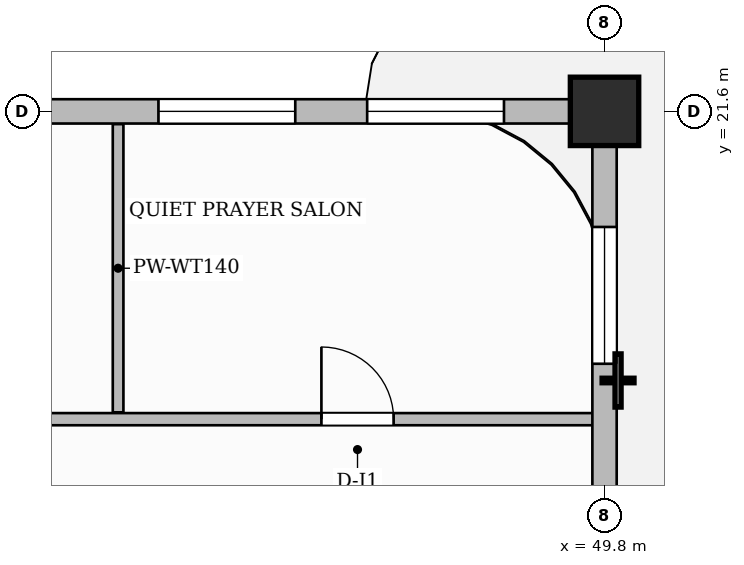
"""IFC4 building model, lengths in metres.
Left out: names, types, materials, properties, quantities, classifications, styles, units other than length and angle.
Written with IfcOpenShell. Run it as: python <this file> out.ifc"""

import sys

from ifc_helpers import new_model, si_unit, direction, frame, frame_2d, origin, origin_2d, place, context, subcontext, project, spatial, rectangle, extrude, source, transform, mapped, element, fill, save


model = new_model("IFC4")
c1 = context("Model", 3, precision=1e-05, world=origin(), true_north=direction((0.0, 1.0)))
c2 = subcontext(c1, "Body", "Model", "MODEL_VIEW")
j1 = project(units=[si_unit("LENGTHUNIT", "METRE"), si_unit("PLANEANGLEUNIT", "RADIAN")], contexts=[c1])
p1 = place(None, origin())
s1 = spatial("IfcSite", under=j1, at=p1, CompositionType="ELEMENT")
p2 = place(p1, origin())
s2 = spatial("IfcBuilding", under=s1, at=p2, CompositionType="ELEMENT")
p3 = place(p2, frame((0.0, 0.0, 240.4)))
s3 = spatial("IfcBuildingStorey", under=s2, at=p3, CompositionType="ELEMENT", Elevation=240.4)
m1 = source(origin(), c2, "Body", "SweptSolid", [
    extrude(rectangle(XDim=0.9, YDim=0.9, at=origin_2d()), origin(), (0.0, 0.0, 1.0), 3.85),
])
p4 = place(p3, frame((49.8, 21.6, 0.0), z_axis=(0.0, 0.0, 1.0), x_axis=(1.0, 0.0, 0.0)))
e1 = element("IfcColumn", 1, at=p4, inside=s3, PredefinedType="COLUMN", context=c2, shape_type="MappedRepresentation", body=[
    mapped(m1, transform((0.0, 0.0, 0.0), scale=1.0)),
])
p5 = place(p3, frame((30.29, 17.55, 0.0), z_axis=(0.0, 0.0, 1.0), x_axis=(1.0, 0.0, 0.0)))
e2 = element("IfcWall", 2, at=p5, inside=s3, PredefinedType="PARTITIONING", context=c2, shape_type="SweptSolid", body=[
    extrude(rectangle(XDim=19.37, YDim=0.16, at=frame_2d((9.685, 0.0))), origin(), (0.0, 0.0, 1.0), 3.6),
])
p6 = place(p5, frame((1.235, 0.0, 0.0)))
e3 = element("IfcOpeningElement", 3, at=p6, cuts=e2, PredefinedType="OPENING", context=c2, shape_type="SweptSolid", body=[
    extrude(rectangle(XDim=0.85, YDim=2.1, at=frame_2d((0.425, 1.05))), frame((0.0, 0.09, 0.0), z_axis=(0.0, -1.0, 0.0), x_axis=(1.0, 0.0, 0.0)), (0.0, 0.0, 1.0), 0.18),
])
p7 = place(p5, frame((7.56, 0.0, 0.0)))
e4 = element("IfcOpeningElement", 4, at=p7, cuts=e2, PredefinedType="OPENING", context=c2, shape_type="SweptSolid", body=[
    extrude(rectangle(XDim=1.4, YDim=2.35, at=frame_2d((0.7, 1.175))), frame((0.0, 0.09, 0.0), z_axis=(0.0, -1.0, 0.0), x_axis=(1.0, 0.0, 0.0)), (0.0, 0.0, 1.0), 0.18),
])
p8 = place(p5, frame((15.785, 0.0, 0.0)))
e5 = element("IfcOpeningElement", 5, at=p8, cuts=e2, PredefinedType="OPENING", context=c2, shape_type="SweptSolid", body=[
    extrude(rectangle(XDim=0.95, YDim=2.15, at=frame_2d((0.475, 1.075))), frame((0.0, 0.09, 0.0), z_axis=(0.0, -1.0, 0.0), x_axis=(1.0, 0.0, 0.0)), (0.0, 0.0, 1.0), 0.18),
])
p9 = place(p3, frame((43.4, 17.64, 0.0), z_axis=(0.0, 0.0, 1.0), x_axis=(0.0, 1.0, 0.0)))
e6 = element("IfcWall", 6, at=p9, inside=s3, PredefinedType="PARTITIONING", context=c2, shape_type="SweptSolid", body=[
    extrude(rectangle(XDim=3.792, YDim=0.14, at=frame_2d((1.896, 0.0))), origin(), (0.0, 0.0, 1.0), 3.6),
])
p10 = place(p3, frame((49.8, 14.62, 0.0), z_axis=(0.0, 0.0, 1.0), x_axis=(0.0, 1.0, 0.0)))
e7 = element("IfcWall", 7, at=p10, inside=s3, PredefinedType="SOLIDWALL", context=c2, shape_type="SweptSolid", body=[
    extrude(rectangle(XDim=6.93, YDim=0.32, at=frame_2d((3.465, 0.0))), origin(), (0.0, 0.0, 1.0), 3.135),
])
p11 = place(p10, frame((0.42, 0.0, 0.0)))
e8 = element("IfcOpeningElement", 8, at=p11, cuts=e7, PredefinedType="OPENING", context=c2, shape_type="SweptSolid", body=[
    extrude(rectangle(XDim=1.2, YDim=2.2, at=frame_2d((0.6, 1.1))), frame((0.0, 0.17, 0.0), z_axis=(0.0, -1.0, 0.0), x_axis=(1.0, 0.0, 0.0)), (0.0, 0.0, 1.0), 0.34),
])
p12 = place(p10, frame((3.659, 0.0, 0.8)))
e9 = element("IfcOpeningElement", 9, at=p12, cuts=e7, PredefinedType="OPENING", context=c2, shape_type="SweptSolid", body=[
    extrude(rectangle(XDim=1.8, YDim=1.85, at=frame_2d((0.9, 0.925))), frame((0.0, 0.17, 0.0), z_axis=(0.0, -1.0, 0.0), x_axis=(1.0, 0.0, 0.0)), (0.0, 0.0, 1.0), 0.34),
])
p13 = place(p3, frame((14.4, 21.6, 0.0), z_axis=(0.0, 0.0, 1.0), x_axis=(1.0, 0.0, 0.0)))
e10 = element("IfcWall", 10, at=p13, inside=s3, PredefinedType="SOLIDWALL", context=c2, shape_type="SweptSolid", body=[
    extrude(rectangle(XDim=35.4, YDim=0.32, at=frame_2d((17.7, 0.0))), origin(), (0.0, 0.0, 1.0), 3.135),
])
p14 = place(p13, frame((0.85, 0.0, 0.0)))
e11 = element("IfcOpeningElement", 11, at=p14, cuts=e10, PredefinedType="OPENING", context=c2, shape_type="SweptSolid", body=[
    extrude(rectangle(XDim=1.2, YDim=2.2, at=frame_2d((0.6, 1.1))), frame((0.0, 0.17, 0.0), z_axis=(0.0, -1.0, 0.0), x_axis=(1.0, 0.0, 0.0)), (0.0, 0.0, 1.0), 0.34),
])
p15 = place(p13, frame((3.475, 0.0, 0.8)))
e12 = element("IfcOpeningElement", 12, at=p15, cuts=e10, PredefinedType="OPENING", context=c2, shape_type="SweptSolid", body=[
    extrude(rectangle(XDim=1.8, YDim=1.85, at=frame_2d((0.9, 0.925))), frame((0.0, 0.17, 0.0), z_axis=(0.0, -1.0, 0.0), x_axis=(1.0, 0.0, 0.0)), (0.0, 0.0, 1.0), 0.34),
])
p16 = place(p13, frame((8.181, 0.0, 0.8)))
e13 = element("IfcOpeningElement", 13, at=p16, cuts=e10, PredefinedType="OPENING", context=c2, shape_type="SweptSolid", body=[
    extrude(rectangle(XDim=0.95, YDim=1.75, at=frame_2d((0.475, 0.875))), frame((0.0, 0.17, 0.0), z_axis=(0.0, -1.0, 0.0), x_axis=(1.0, 0.0, 0.0)), (0.0, 0.0, 1.0), 0.34),
])
p17 = place(p13, frame((10.564, 0.0, 0.8)))
e14 = element("IfcOpeningElement", 14, at=p17, cuts=e10, PredefinedType="OPENING", context=c2, shape_type="SweptSolid", body=[
    extrude(rectangle(XDim=1.8, YDim=1.85, at=frame_2d((0.9, 0.925))), frame((0.0, 0.17, 0.0), z_axis=(0.0, -1.0, 0.0), x_axis=(1.0, 0.0, 0.0)), (0.0, 0.0, 1.0), 0.34),
])
p18 = place(p13, frame((16.651, 0.0, 0.8)))
e15 = element("IfcOpeningElement", 15, at=p18, cuts=e10, PredefinedType="OPENING", context=c2, shape_type="SweptSolid", body=[
    extrude(rectangle(XDim=1.8, YDim=1.85, at=frame_2d((0.9, 0.925))), frame((0.0, 0.17, 0.0), z_axis=(0.0, -1.0, 0.0), x_axis=(1.0, 0.0, 0.0)), (0.0, 0.0, 1.0), 0.34),
])
p19 = place(p13, frame((21.725, 0.0, 0.8)))
e16 = element("IfcOpeningElement", 16, at=p19, cuts=e10, PredefinedType="OPENING", context=c2, shape_type="SweptSolid", body=[
    extrude(rectangle(XDim=1.8, YDim=1.85, at=frame_2d((0.9, 0.925))), frame((0.0, 0.17, 0.0), z_axis=(0.0, -1.0, 0.0), x_axis=(1.0, 0.0, 0.0)), (0.0, 0.0, 1.0), 0.34),
])
p20 = place(p13, frame((24.475, 0.0, 0.8)))
e17 = element("IfcOpeningElement", 17, at=p20, cuts=e10, PredefinedType="OPENING", context=c2, shape_type="SweptSolid", body=[
    extrude(rectangle(XDim=1.8, YDim=1.85, at=frame_2d((0.9, 0.925))), frame((0.0, 0.17, 0.0), z_axis=(0.0, -1.0, 0.0), x_axis=(1.0, 0.0, 0.0)), (0.0, 0.0, 1.0), 0.34),
])
p21 = place(p13, frame((29.531, 0.0, 0.8)))
e18 = element("IfcOpeningElement", 18, at=p21, cuts=e10, PredefinedType="OPENING", context=c2, shape_type="SweptSolid", body=[
    extrude(rectangle(XDim=1.8, YDim=1.85, at=frame_2d((0.9, 0.925))), frame((0.0, 0.17, 0.0), z_axis=(0.0, -1.0, 0.0), x_axis=(1.0, 0.0, 0.0)), (0.0, 0.0, 1.0), 0.34),
])
p22 = place(p13, frame((32.277, 0.0, 0.8)))
e19 = element("IfcOpeningElement", 19, at=p22, cuts=e10, PredefinedType="OPENING", context=c2, shape_type="SweptSolid", body=[
    extrude(rectangle(XDim=1.8, YDim=1.85, at=frame_2d((0.9, 0.925))), frame((0.0, 0.17, 0.0), z_axis=(0.0, -1.0, 0.0), x_axis=(1.0, 0.0, 0.0)), (0.0, 0.0, 1.0), 0.34),
])
m2 = source(origin(), c2, "Body", "SweptSolid", [
    extrude(rectangle(XDim=0.95, YDim=2.15, at=frame_2d((0.475, 1.075))), frame((0.0, 0.025, 0.0), z_axis=(0.0, -1.0, 0.0), x_axis=(1.0, 0.0, 0.0)), (0.0, 0.0, 1.0), 0.05),
])
p23 = place(p8, origin())
e20 = element("IfcDoor", 20, at=p23, inside=s3, OperationType="SINGLE_SWING_LEFT", PredefinedType="DOOR", context=c2, shape_type="MappedRepresentation", body=[
    mapped(m2, transform((0.0, 0.0, 0.0), scale=1.0)),
])
fill(e5, e20)
m3 = source(origin(), c2, "Body", "SweptSolid", [
    extrude(rectangle(XDim=1.8, YDim=1.85, at=frame_2d((0.9, 0.925))), frame((0.0, 0.03, 0.0), z_axis=(0.0, -1.0, 0.0), x_axis=(1.0, 0.0, 0.0)), (0.0, 0.0, 1.0), 0.06),
])
p24 = place(p12, origin())
e21 = element("IfcWindow", 21, at=p24, inside=s3, PartitioningType="DOUBLE_PANEL_VERTICAL", PredefinedType="WINDOW", context=c2, shape_type="MappedRepresentation", body=[
    mapped(m3, transform((0.0, 0.0, 0.0), scale=1.0)),
])
fill(e9, e21)
p25 = place(p21, origin())
e22 = element("IfcWindow", 22, at=p25, inside=s3, PartitioningType="DOUBLE_PANEL_VERTICAL", PredefinedType="WINDOW", context=c2, shape_type="MappedRepresentation", body=[
    mapped(m3, transform((0.0, 0.0, 0.0), scale=1.0)),
])
fill(e18, e22)
p26 = place(p22, origin())
e23 = element("IfcWindow", 23, at=p26, inside=s3, PartitioningType="DOUBLE_PANEL_VERTICAL", PredefinedType="WINDOW", context=c2, shape_type="MappedRepresentation", body=[
    mapped(m3, transform((0.0, 0.0, 0.0), scale=1.0)),
])
fill(e19, e23)
save(model, sys.argv[1])
